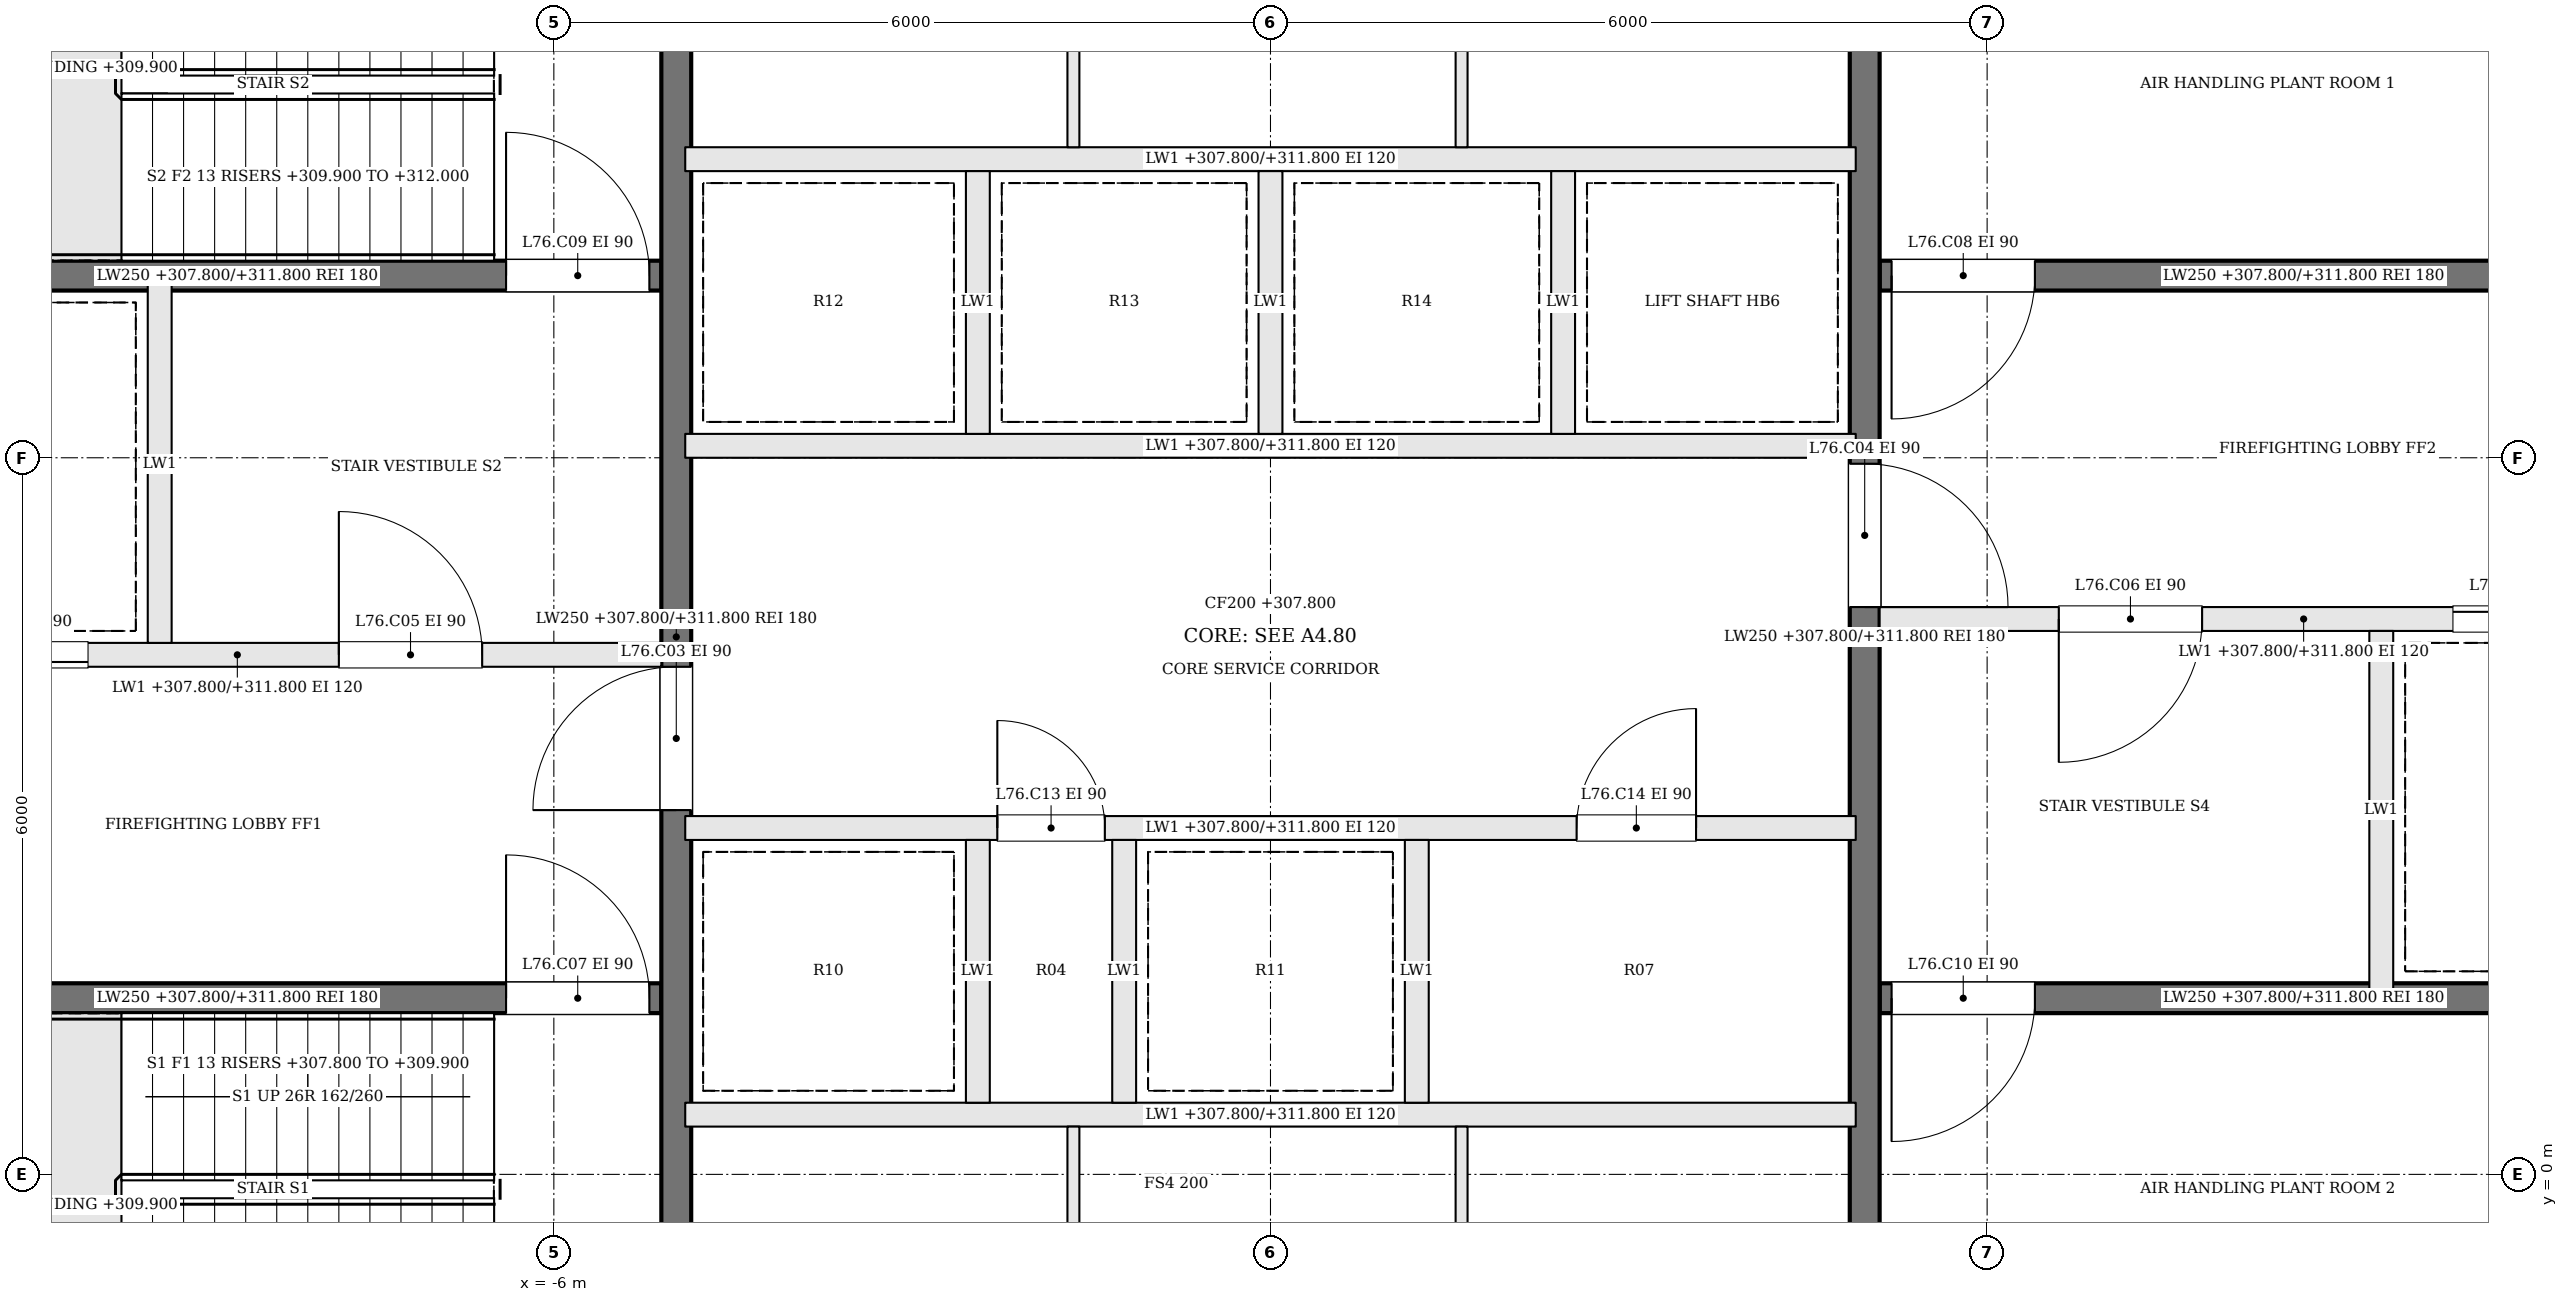
"""IFC4 building model, lengths in metres.
Left out: names, types, materials, properties, quantities, classifications, styles, units other than length and angle.
Written with IfcOpenShell. Run it as: python <this file> out.ifc"""

import sys

from ifc_helpers import new_model, si_unit, direction, frame, frame_2d, origin, place, context, subcontext, project, spatial, rectangle, extrude, element, fill, save


model = new_model("IFC4")
c1 = context("Model", 3, precision=1e-05, world=origin(), true_north=direction((0.0, 1.0)))
c2 = subcontext(c1, "Body", "Model", "MODEL_VIEW")
j1 = project(units=[si_unit("LENGTHUNIT", "METRE"), si_unit("PLANEANGLEUNIT", "RADIAN")], contexts=[c1])
p1 = place(None, origin())
s1 = spatial("IfcSite", under=j1, at=p1, CompositionType="ELEMENT")
p2 = place(p1, origin())
s2 = spatial("IfcBuilding", under=s1, at=p2, CompositionType="ELEMENT")
p3 = place(p2, frame((0.0, 0.0, 307.8)))
s3 = spatial("IfcBuildingStorey", under=s2, at=p3, CompositionType="ELEMENT", Elevation=307.8)
p4 = place(p3, frame((-12.2, 1.475, 0.0), z_axis=(0.0, 0.0, 1.0), x_axis=(1.0, 0.0, 0.0)))
e1 = element("IfcWall", 1, at=p4, inside=s3, PredefinedType="SOLIDWALL", context=c2, shape_type="SweptSolid", body=[
    extrude(rectangle(XDim=7.1, YDim=0.25, at=frame_2d((3.55, 0.0))), origin(), (0.0, 0.0, 1.0), 4.0),
])
p5 = place(p4, frame((5.8, 0.0, 0.0)))
e2 = element("IfcOpeningElement", 2, at=p5, cuts=e1, PredefinedType="OPENING", context=c2, shape_type="SweptSolid", body=[
    extrude(rectangle(XDim=1.2, YDim=2.1, at=frame_2d((0.6, 1.05))), frame((0.0, 0.135, 0.0), z_axis=(0.0, -1.0, 0.0), x_axis=(1.0, 0.0, 0.0)), (0.0, 0.0, 1.0), 0.27),
])
p6 = place(p3, frame((12.2, 7.525, 0.0), z_axis=(0.0, 0.0, 1.0), x_axis=(-1.0, 0.0, 0.0)))
e3 = element("IfcWall", 3, at=p6, inside=s3, PredefinedType="SOLIDWALL", context=c2, shape_type="SweptSolid", body=[
    extrude(rectangle(XDim=7.1, YDim=0.25, at=frame_2d((3.55, 0.0))), origin(), (0.0, 0.0, 1.0), 4.0),
])
p7 = place(p6, frame((5.8, 0.0, 0.0)))
e4 = element("IfcOpeningElement", 4, at=p7, cuts=e3, PredefinedType="OPENING", context=c2, shape_type="SweptSolid", body=[
    extrude(rectangle(XDim=1.2, YDim=2.1, at=frame_2d((0.6, 1.05))), frame((0.0, 0.135, 0.0), z_axis=(0.0, -1.0, 0.0), x_axis=(1.0, 0.0, 0.0)), (0.0, 0.0, 1.0), 0.27),
])
p8 = place(p3, frame((-12.2, 4.35, 0.0), z_axis=(0.0, 0.0, 1.0), x_axis=(1.0, 0.0, 0.0)))
e5 = element("IfcWall", 5, at=p8, inside=s3, PredefinedType="SOLIDWALL", context=c2, shape_type="SweptSolid", body=[
    extrude(rectangle(XDim=7.1, YDim=0.2, at=frame_2d((3.55, 0.0))), origin(), (0.0, 0.0, 1.0), 4.0),
])
p9 = place(p8, frame((4.4, 0.0, 0.0)))
e6 = element("IfcOpeningElement", 6, at=p9, cuts=e5, PredefinedType="OPENING", context=c2, shape_type="SweptSolid", body=[
    extrude(rectangle(XDim=1.2, YDim=2.1, at=frame_2d((0.6, 1.05))), frame((0.0, 0.11, 0.0), z_axis=(0.0, -1.0, 0.0), x_axis=(1.0, 0.0, 0.0)), (0.0, 0.0, 1.0), 0.22),
])
p10 = place(p8, frame((1.1, 0.0, 0.0)))
e7 = element("IfcOpeningElement", 7, at=p10, cuts=e5, PredefinedType="OPENING", context=c2, shape_type="SweptSolid", body=[
    extrude(rectangle(XDim=1.2, YDim=2.1, at=frame_2d((0.6, 1.05))), frame((0.0, 0.11, 0.0), z_axis=(0.0, -1.0, 0.0), x_axis=(1.0, 0.0, 0.0)), (0.0, 0.0, 1.0), 0.22),
])
p11 = place(p3, frame((12.2, 4.65, 0.0), z_axis=(0.0, 0.0, 1.0), x_axis=(-1.0, 0.0, 0.0)))
e8 = element("IfcWall", 8, at=p11, inside=s3, PredefinedType="SOLIDWALL", context=c2, shape_type="SweptSolid", body=[
    extrude(rectangle(XDim=7.1, YDim=0.2, at=frame_2d((3.55, 0.0))), origin(), (0.0, 0.0, 1.0), 4.0),
])
p12 = place(p11, frame((4.4, 0.0, 0.0)))
e9 = element("IfcOpeningElement", 9, at=p12, cuts=e8, PredefinedType="OPENING", context=c2, shape_type="SweptSolid", body=[
    extrude(rectangle(XDim=1.2, YDim=2.1, at=frame_2d((0.6, 1.05))), frame((0.0, 0.11, 0.0), z_axis=(0.0, -1.0, 0.0), x_axis=(1.0, 0.0, 0.0)), (0.0, 0.0, 1.0), 0.22),
])
p13 = place(p11, frame((1.1, 0.0, 0.0)))
e10 = element("IfcOpeningElement", 10, at=p13, cuts=e8, PredefinedType="OPENING", context=c2, shape_type="SweptSolid", body=[
    extrude(rectangle(XDim=1.2, YDim=2.1, at=frame_2d((0.6, 1.05))), frame((0.0, 0.11, 0.0), z_axis=(0.0, -1.0, 0.0), x_axis=(1.0, 0.0, 0.0)), (0.0, 0.0, 1.0), 0.22),
])
p14 = place(p3, frame((-12.2, 7.525, 0.0), z_axis=(0.0, 0.0, 1.0), x_axis=(1.0, 0.0, 0.0)))
e11 = element("IfcWall", 11, at=p14, inside=s3, PredefinedType="SOLIDWALL", context=c2, shape_type="SweptSolid", body=[
    extrude(rectangle(XDim=7.1, YDim=0.25, at=frame_2d((3.55, 0.0))), origin(), (0.0, 0.0, 1.0), 4.0),
])
p15 = place(p14, frame((5.8, 0.0, 0.0)))
e12 = element("IfcOpeningElement", 12, at=p15, cuts=e11, PredefinedType="OPENING", context=c2, shape_type="SweptSolid", body=[
    extrude(rectangle(XDim=1.2, YDim=2.1, at=frame_2d((0.6, 1.05))), frame((0.0, 0.135, 0.0), z_axis=(0.0, -1.0, 0.0), x_axis=(1.0, 0.0, 0.0)), (0.0, 0.0, 1.0), 0.27),
])
p16 = place(p3, frame((12.2, 1.475, 0.0), z_axis=(0.0, 0.0, 1.0), x_axis=(-1.0, 0.0, 0.0)))
e13 = element("IfcWall", 13, at=p16, inside=s3, PredefinedType="SOLIDWALL", context=c2, shape_type="SweptSolid", body=[
    extrude(rectangle(XDim=7.1, YDim=0.25, at=frame_2d((3.55, 0.0))), origin(), (0.0, 0.0, 1.0), 4.0),
])
p17 = place(p16, frame((5.8, 0.0, 0.0)))
e14 = element("IfcOpeningElement", 14, at=p17, cuts=e13, PredefinedType="OPENING", context=c2, shape_type="SweptSolid", body=[
    extrude(rectangle(XDim=1.2, YDim=2.1, at=frame_2d((0.6, 1.05))), frame((0.0, 0.135, 0.0), z_axis=(0.0, -1.0, 0.0), x_axis=(1.0, 0.0, 0.0)), (0.0, 0.0, 1.0), 0.27),
])
for number, where, z_axis, x_axis in (
    (15, (-9.3, 4.45, 0.0), (0.0, 0.0, 1.0), (0.0, 1.0, 0.0)),
    (16, (9.3, 4.55, 0.0), (0.0, 0.0, 1.0), (0.0, -1.0, 0.0)),
):
    element("IfcWall", number, at=place(p3, frame(where, z_axis=z_axis, x_axis=x_axis)), inside=s3, PredefinedType="SOLIDWALL", context=c2, shape_type="SweptSolid", body=[
        extrude(rectangle(XDim=3.0, YDim=0.2, at=frame_2d((1.5, 0.0))), origin(), (0.0, 0.0, 1.0), 4.0),
    ])
p18 = place(p3, frame((-4.975, -2.2, 0.0), z_axis=(0.0, 0.0, 1.0), x_axis=(0.0, 1.0, 0.0)))
e17 = element("IfcWall", 17, at=p18, inside=s3, PredefinedType="SOLIDWALL", context=c2, shape_type="SweptSolid", body=[
    extrude(rectangle(XDim=13.4, YDim=0.25, at=frame_2d((6.7, 0.0))), origin(), (0.0, 0.0, 1.0), 4.0),
])
p19 = place(p18, frame((5.25, 0.0, 0.0)))
e18 = element("IfcOpeningElement", 18, at=p19, cuts=e17, PredefinedType="OPENING", context=c2, shape_type="SweptSolid", body=[
    extrude(rectangle(XDim=1.2, YDim=2.1, at=frame_2d((0.6, 1.05))), frame((0.0, 0.135, 0.0), z_axis=(0.0, -1.0, 0.0), x_axis=(1.0, 0.0, 0.0)), (0.0, 0.0, 1.0), 0.27),
])
p20 = place(p3, frame((4.975, 11.2, 0.0), z_axis=(0.0, 0.0, 1.0), x_axis=(0.0, -1.0, 0.0)))
e19 = element("IfcWall", 19, at=p20, inside=s3, PredefinedType="SOLIDWALL", context=c2, shape_type="SweptSolid", body=[
    extrude(rectangle(XDim=13.4, YDim=0.25, at=frame_2d((6.7, 0.0))), origin(), (0.0, 0.0, 1.0), 4.0),
])
p21 = place(p20, frame((5.25, 0.0, 0.0)))
e20 = element("IfcOpeningElement", 20, at=p21, cuts=e19, PredefinedType="OPENING", context=c2, shape_type="SweptSolid", body=[
    extrude(rectangle(XDim=1.2, YDim=2.1, at=frame_2d((0.6, 1.05))), frame((0.0, 0.135, 0.0), z_axis=(0.0, -1.0, 0.0), x_axis=(1.0, 0.0, 0.0)), (0.0, 0.0, 1.0), 0.27),
])
p22 = place(p3, frame((-4.9, 0.5, 0.0), z_axis=(0.0, 0.0, 1.0), x_axis=(1.0, 0.0, 0.0)))
e21 = element("IfcWall", 21, at=p22, inside=s3, PredefinedType="SOLIDWALL", context=c2, shape_type="SweptSolid", body=[
    extrude(rectangle(XDim=9.8, YDim=0.2, at=frame_2d((4.9, 0.0))), origin(), (0.0, 0.0, 1.0), 4.0),
])
p23 = place(p3, frame((-4.9, 2.9, 0.0), z_axis=(0.0, 0.0, 1.0), x_axis=(1.0, 0.0, 0.0)))
e22 = element("IfcWall", 22, at=p23, inside=s3, PredefinedType="SOLIDWALL", context=c2, shape_type="SweptSolid", body=[
    extrude(rectangle(XDim=9.8, YDim=0.2, at=frame_2d((4.9, 0.0))), origin(), (0.0, 0.0, 1.0), 4.0),
])
p24 = place(p23, frame((2.613, 0.0, 0.0)))
e23 = element("IfcOpeningElement", 23, at=p24, cuts=e22, PredefinedType="OPENING", context=c2, shape_type="SweptSolid", body=[
    extrude(rectangle(XDim=0.9, YDim=2.1, at=frame_2d((0.45, 1.05))), frame((0.0, 0.11, 0.0), z_axis=(0.0, -1.0, 0.0), x_axis=(1.0, 0.0, 0.0)), (0.0, 0.0, 1.0), 0.22),
])
p25 = place(p23, frame((7.463, 0.0, 0.0)))
e24 = element("IfcOpeningElement", 24, at=p25, cuts=e22, PredefinedType="OPENING", context=c2, shape_type="SweptSolid", body=[
    extrude(rectangle(XDim=1.0, YDim=2.1, at=frame_2d((0.5, 1.05))), frame((0.0, 0.11, 0.0), z_axis=(0.0, -1.0, 0.0), x_axis=(1.0, 0.0, 0.0)), (0.0, 0.0, 1.0), 0.22),
])
for number, where, z_axis, x_axis in (
    (25, (-4.9, 6.1, 0.0), (0.0, 0.0, 1.0), (1.0, 0.0, 0.0)),
    (26, (-4.9, 8.5, 0.0), (0.0, 0.0, 1.0), (1.0, 0.0, 0.0)),
):
    element("IfcWall", number, at=place(p3, frame(where, z_axis=z_axis, x_axis=x_axis)), inside=s3, PredefinedType="SOLIDWALL", context=c2, shape_type="SweptSolid", body=[
        extrude(rectangle(XDim=9.8, YDim=0.2, at=frame_2d((4.9, 0.0))), origin(), (0.0, 0.0, 1.0), 4.0),
    ])
for number, where, z_axis, x_axis in (
    (27, (-2.45, 0.6, 0.0), (0.0, 0.0, 1.0), (0.0, 1.0, 0.0)),
    (28, (-1.225, 0.6, 0.0), (0.0, 0.0, 1.0), (0.0, 1.0, 0.0)),
    (29, (1.225, 0.6, 0.0), (0.0, 0.0, 1.0), (0.0, 1.0, 0.0)),
    (30, (-2.45, 6.2, 0.0), (0.0, 0.0, 1.0), (0.0, 1.0, 0.0)),
    (31, (0.0, 6.2, 0.0), (0.0, 0.0, 1.0), (0.0, 1.0, 0.0)),
    (32, (2.45, 6.2, 0.0), (0.0, 0.0, 1.0), (0.0, 1.0, 0.0)),
):
    element("IfcWall", number, at=place(p3, frame(where, z_axis=z_axis, x_axis=x_axis)), inside=s3, PredefinedType="SOLIDWALL", context=c2, shape_type="SweptSolid", body=[
        extrude(rectangle(XDim=2.2, YDim=0.2, at=frame_2d((1.1, 0.0))), origin(), (0.0, 0.0, 1.0), 4.0),
    ])
for number, where, z_axis, x_axis in (
    (33, (-1.65, -2.2, 0.0), (0.0, 0.0, 1.0), (0.0, 1.0, 0.0)),
    (34, (1.6, -2.2, 0.0), (0.0, 0.0, 1.0), (0.0, 1.0, 0.0)),
    (35, (-1.65, 8.6, 0.0), (0.0, 0.0, 1.0), (0.0, 1.0, 0.0)),
    (36, (1.6, 8.6, 0.0), (0.0, 0.0, 1.0), (0.0, 1.0, 0.0)),
):
    element("IfcWall", number, at=place(p3, frame(where, z_axis=z_axis, x_axis=x_axis)), inside=s3, PredefinedType="PARTITIONING", context=c2, shape_type="SweptSolid", body=[
        extrude(rectangle(XDim=2.6, YDim=0.1, at=frame_2d((1.3, 0.0))), origin(), (0.0, 0.0, 1.0), 4.0),
    ])
p26 = place(p19, origin())
e37 = element("IfcDoor", 37, at=p26, inside=s3, OperationType="SINGLE_SWING_LEFT", PredefinedType="DOOR", context=c2, shape_type="SweptSolid", body=[
    extrude(rectangle(XDim=1.2, YDim=2.1, at=frame_2d((0.6, 1.05))), frame((0.0, 0.025, 0.0), z_axis=(0.0, -1.0, 0.0), x_axis=(1.0, 0.0, 0.0)), (0.0, 0.0, 1.0), 0.05),
])
fill(e18, e37)
p27 = place(p21, origin())
e38 = element("IfcDoor", 38, at=p27, inside=s3, OperationType="SINGLE_SWING_RIGHT", PredefinedType="DOOR", context=c2, shape_type="SweptSolid", body=[
    extrude(rectangle(XDim=1.2, YDim=2.1, at=frame_2d((0.6, 1.05))), frame((0.0, 0.025, 0.0), z_axis=(0.0, -1.0, 0.0), x_axis=(1.0, 0.0, 0.0)), (0.0, 0.0, 1.0), 0.05),
])
fill(e20, e38)
p28 = place(p9, origin())
e39 = element("IfcDoor", 39, at=p28, inside=s3, OperationType="SINGLE_SWING_LEFT", PredefinedType="DOOR", context=c2, shape_type="SweptSolid", body=[
    extrude(rectangle(XDim=1.2, YDim=2.1, at=frame_2d((0.6, 1.05))), frame((0.0, 0.025, 0.0), z_axis=(0.0, -1.0, 0.0), x_axis=(1.0, 0.0, 0.0)), (0.0, 0.0, 1.0), 0.05),
])
fill(e6, e39)
p29 = place(p12, origin())
e40 = element("IfcDoor", 40, at=p29, inside=s3, OperationType="SINGLE_SWING_RIGHT", PredefinedType="DOOR", context=c2, shape_type="SweptSolid", body=[
    extrude(rectangle(XDim=1.2, YDim=2.1, at=frame_2d((0.6, 1.05))), frame((0.0, 0.025, 0.0), z_axis=(0.0, -1.0, 0.0), x_axis=(1.0, 0.0, 0.0)), (0.0, 0.0, 1.0), 0.05),
])
fill(e9, e40)
p30 = place(p5, origin())
e41 = element("IfcDoor", 41, at=p30, inside=s3, OperationType="SINGLE_SWING_LEFT", PredefinedType="DOOR", context=c2, shape_type="SweptSolid", body=[
    extrude(rectangle(XDim=1.2, YDim=2.1, at=frame_2d((0.6, 1.05))), frame((0.0, 0.025, 0.0), z_axis=(0.0, -1.0, 0.0), x_axis=(1.0, 0.0, 0.0)), (0.0, 0.0, 1.0), 0.05),
])
fill(e2, e41)
p31 = place(p7, origin())
e42 = element("IfcDoor", 42, at=p31, inside=s3, OperationType="SINGLE_SWING_RIGHT", PredefinedType="DOOR", context=c2, shape_type="SweptSolid", body=[
    extrude(rectangle(XDim=1.2, YDim=2.1, at=frame_2d((0.6, 1.05))), frame((0.0, 0.025, 0.0), z_axis=(0.0, -1.0, 0.0), x_axis=(1.0, 0.0, 0.0)), (0.0, 0.0, 1.0), 0.05),
])
fill(e4, e42)
p32 = place(p15, origin())
e43 = element("IfcDoor", 43, at=p32, inside=s3, OperationType="SINGLE_SWING_LEFT", PredefinedType="DOOR", context=c2, shape_type="SweptSolid", body=[
    extrude(rectangle(XDim=1.2, YDim=2.1, at=frame_2d((0.6, 1.05))), frame((0.0, 0.025, 0.0), z_axis=(0.0, -1.0, 0.0), x_axis=(1.0, 0.0, 0.0)), (0.0, 0.0, 1.0), 0.05),
])
fill(e12, e43)
p33 = place(p17, origin())
e44 = element("IfcDoor", 44, at=p33, inside=s3, OperationType="SINGLE_SWING_RIGHT", PredefinedType="DOOR", context=c2, shape_type="SweptSolid", body=[
    extrude(rectangle(XDim=1.2, YDim=2.1, at=frame_2d((0.6, 1.05))), frame((0.0, 0.025, 0.0), z_axis=(0.0, -1.0, 0.0), x_axis=(1.0, 0.0, 0.0)), (0.0, 0.0, 1.0), 0.05),
])
fill(e14, e44)
p34 = place(p10, origin())
e45 = element("IfcDoor", 45, at=p34, inside=s3, OperationType="SLIDING_TO_RIGHT", PredefinedType="DOOR", context=c2, shape_type="SweptSolid", body=[
    extrude(rectangle(XDim=1.2, YDim=2.1, at=frame_2d((0.6, 1.05))), frame((0.0, 0.025, 0.0), z_axis=(0.0, -1.0, 0.0), x_axis=(1.0, 0.0, 0.0)), (0.0, 0.0, 1.0), 0.05),
])
fill(e7, e45)
p35 = place(p13, origin())
e46 = element("IfcDoor", 46, at=p35, inside=s3, OperationType="SLIDING_TO_RIGHT", PredefinedType="DOOR", context=c2, shape_type="SweptSolid", body=[
    extrude(rectangle(XDim=1.2, YDim=2.1, at=frame_2d((0.6, 1.05))), frame((0.0, 0.025, 0.0), z_axis=(0.0, -1.0, 0.0), x_axis=(1.0, 0.0, 0.0)), (0.0, 0.0, 1.0), 0.05),
])
fill(e10, e46)
p36 = place(p24, origin())
e47 = element("IfcDoor", 47, at=p36, inside=s3, OperationType="SINGLE_SWING_LEFT", PredefinedType="DOOR", context=c2, shape_type="SweptSolid", body=[
    extrude(rectangle(XDim=0.9, YDim=2.1, at=frame_2d((0.45, 1.05))), frame((0.0, 0.025, 0.0), z_axis=(0.0, -1.0, 0.0), x_axis=(1.0, 0.0, 0.0)), (0.0, 0.0, 1.0), 0.05),
])
fill(e23, e47)
p37 = place(p25, origin())
e48 = element("IfcDoor", 48, at=p37, inside=s3, OperationType="SINGLE_SWING_RIGHT", PredefinedType="DOOR", context=c2, shape_type="SweptSolid", body=[
    extrude(rectangle(XDim=1.0, YDim=2.1, at=frame_2d((0.5, 1.05))), frame((0.0, 0.025, 0.0), z_axis=(0.0, -1.0, 0.0), x_axis=(1.0, 0.0, 0.0)), (0.0, 0.0, 1.0), 0.05),
])
fill(e24, e48)
save(model, sys.argv[1])
